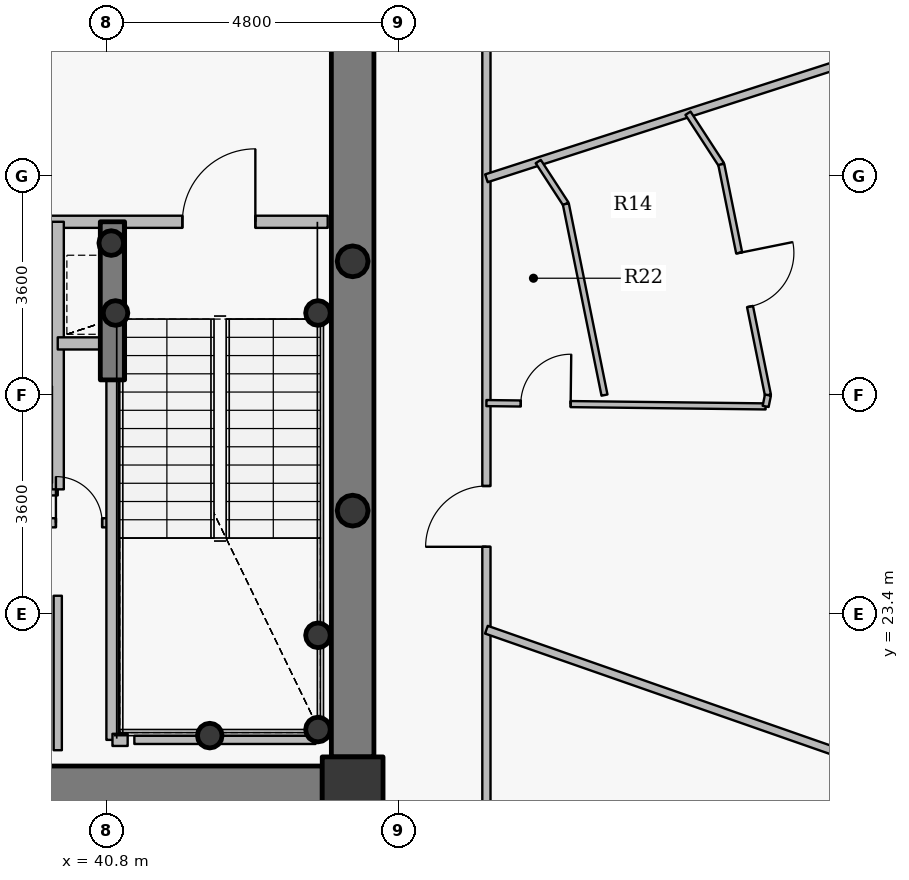
"""IFC4 building model, lengths in metres.
Left out: names, types, materials, properties, quantities, classifications, styles, units other than length and angle.
Written with IfcOpenShell. Run it as: python <this file> out.ifc"""

import sys

from ifc_helpers import new_model, si_unit, direction, frame, frame_2d, origin, origin_2d, place, context, subcontext, project, spatial, rectangle, hollow_circle, extrude, source, transform, mapped, element, fill, save


model = new_model("IFC4")
c1 = context("Model", 3, precision=1e-05, world=origin(), true_north=direction((0.0, 1.0)))
c2 = subcontext(c1, "Body", "Model", "MODEL_VIEW")
j1 = project(units=[si_unit("LENGTHUNIT", "METRE"), si_unit("PLANEANGLEUNIT", "RADIAN")], contexts=[c1])
p1 = place(None, origin())
s1 = spatial("IfcSite", under=j1, at=p1, CompositionType="ELEMENT")
p2 = place(p1, origin())
s2 = spatial("IfcBuilding", under=s1, at=p2, CompositionType="ELEMENT")
p3 = place(p2, frame((0.0, 0.0, 303.0)))
s3 = spatial("IfcBuildingStorey", under=s2, at=p3, CompositionType="ELEMENT", Elevation=303.0)
p4 = place(p3, frame((44.85, 20.55, 0.0), z_axis=(0.0, 0.0, 1.0), x_axis=(1.0, 0.0, 0.0)))
e1 = element("IfcColumn", 1, at=p4, inside=s3, PredefinedType="COLUMN", context=c2, shape_type="SweptSolid", body=[
    extrude(rectangle(XDim=1.0, YDim=1.0, at=origin_2d()), origin(), (0.0, 0.0, 1.0), 3.75),
])
for number, where, z_axis, x_axis in (
    (2, (44.28, 21.5, 0.0), (0.0, 0.0, 1.0), (1.0, 0.0, 0.0)),
    (3, (44.28, 23.05, 0.0), (0.0, 0.0, 1.0), (1.0, 0.0, 0.0)),
    (4, (42.5, 21.4, 0.0), (0.0, 0.0, 1.0), (1.0, 0.0, 0.0)),
    (5, (40.95, 28.35, 0.0), (0.0, 0.0, 1.0), (1.0, 0.0, 0.0)),
    (6, (44.28, 28.35, 0.0), (0.0, 0.0, 1.0), (1.0, 0.0, 0.0)),
    (7, (40.88, 29.5, 0.0), (0.0, 0.0, 1.0), (1.0, 0.0, 0.0)),
):
    element("IfcColumn", number, at=place(p3, frame(where, z_axis=z_axis, x_axis=x_axis)), inside=s3, PredefinedType="COLUMN", context=c2, shape_type="SweptSolid", body=[
        extrude(hollow_circle(Radius=0.203, WallThickness=0.016, at=origin_2d()), origin(), (0.0, 0.0, 1.0), 3.75),
    ])
p5 = place(p3, frame((44.85, 32.95, 0.0), z_axis=(0.0, 0.0, 1.0), x_axis=(0.0, -1.0, 0.0)))
e8 = element("IfcWall", 8, at=p5, inside=s3, PredefinedType="SHEAR", context=c2, shape_type="SweptSolid", body=[
    extrude(rectangle(XDim=11.9, YDim=0.7, at=frame_2d((5.95, 0.0))), origin(), (0.0, 0.0, 1.0), 3.05),
])
p6 = place(p3, frame((44.35, 20.55, 0.0), z_axis=(0.0, 0.0, 1.0), x_axis=(-1.0, 0.0, 0.0)))
e9 = element("IfcWall", 9, at=p6, inside=s3, PredefinedType="SHEAR", context=c2, shape_type="SweptSolid", body=[
    extrude(rectangle(XDim=16.7, YDim=0.7, at=frame_2d((8.35, 0.0))), origin(), (0.0, 0.0, 1.0), 3.05),
])
p7 = place(p6, frame((12.925, 0.0, 0.0)))
e10 = element("IfcOpeningElement", 10, at=p7, cuts=e9, PredefinedType="OPENING", context=c2, shape_type="SweptSolid", body=[
    extrude(rectangle(XDim=1.15, YDim=2.15, at=origin_2d()), frame((0.575, 0.36, 1.075), z_axis=(0.0, -1.0, 0.0), x_axis=(1.0, 0.0, 0.0)), (0.0, 0.0, 1.0), 0.72),
])
p8 = place(p6, frame((9.1, 0.0, 0.0)))
e11 = element("IfcOpeningElement", 11, at=p8, cuts=e9, PredefinedType="OPENING", context=c2, shape_type="SweptSolid", body=[
    extrude(rectangle(XDim=1.15, YDim=2.15, at=origin_2d()), frame((0.575, 0.36, 1.075), z_axis=(0.0, -1.0, 0.0), x_axis=(1.0, 0.0, 0.0)), (0.0, 0.0, 1.0), 0.72),
])
p9 = place(p3, frame((40.9, 27.25, 0.0), z_axis=(0.0, 0.0, 1.0), x_axis=(0.0, 1.0, 0.0)))
e12 = element("IfcWall", 12, at=p9, inside=s3, PredefinedType="SHEAR", context=c2, shape_type="SweptSolid", body=[
    extrude(rectangle(XDim=2.6, YDim=0.4, at=frame_2d((1.3, 0.0))), origin(), (0.0, 0.0, 1.0), 3.1),
])
for number, where, z_axis, x_axis in (
    (13, (44.85, 25.1, 0.0), (0.0, 0.0, 1.0), (1.0, 0.0, 0.0)),
    (14, (44.85, 29.2, 0.0), (0.0, 0.0, 1.0), (1.0, 0.0, 0.0)),
):
    element("IfcColumn", number, at=place(p3, frame(where, z_axis=z_axis, x_axis=x_axis)), inside=s3, PredefinedType="COLUMN", context=c2, shape_type="SweptSolid", body=[
        extrude(hollow_circle(Radius=0.254, WallThickness=0.02, at=origin_2d()), origin(), (0.0, 0.0, 1.0), 3.75),
    ])
p10 = place(p3, frame((35.05, 27.25, 0.0), z_axis=(0.0, 0.0, 1.0), x_axis=(1.0, 0.0, 0.0)))
e15 = element("IfcWall", 15, at=p10, inside=s3, PredefinedType="PARTITIONING", context=c2, shape_type="SweptSolid", body=[
    extrude(rectangle(XDim=4.95, YDim=0.2, at=frame_2d((2.475, 0.0))), origin(), (0.0, 0.0, 1.0), 3.085),
])
p11 = place(p3, frame((35.45, 25.45, 0.0), z_axis=(0.0, 0.0, 1.0), x_axis=(1.0, 0.0, 0.0)))
e16 = element("IfcWall", 16, at=p11, inside=s3, PredefinedType="PARTITIONING", context=c2, shape_type="SweptSolid", body=[
    extrude(rectangle(XDim=4.55, YDim=0.2, at=frame_2d((2.275, 0.0))), origin(), (0.0, 0.0, 1.0), 3.085),
])
p12 = place(p11, frame((0.25, 0.0, 0.0)))
e17 = element("IfcOpeningElement", 17, at=p12, cuts=e16, PredefinedType="OPENING", context=c2, shape_type="SweptSolid", body=[
    extrude(rectangle(XDim=1.05, YDim=2.15, at=origin_2d()), frame((0.525, 0.11, 1.075), z_axis=(0.0, -1.0, 0.0), x_axis=(1.0, 0.0, 0.0)), (0.0, 0.0, 1.0), 0.22),
])
p13 = place(p11, frame((1.745, 0.0, 0.0)))
e18 = element("IfcOpeningElement", 18, at=p13, cuts=e16, PredefinedType="OPENING", context=c2, shape_type="SweptSolid", body=[
    extrude(rectangle(XDim=1.05, YDim=2.15, at=origin_2d()), frame((0.525, 0.11, 1.075), z_axis=(0.0, -1.0, 0.0), x_axis=(1.0, 0.0, 0.0)), (0.0, 0.0, 1.0), 0.22),
])
p14 = place(p11, frame((3.165, 0.0, 0.0)))
e19 = element("IfcOpeningElement", 19, at=p14, cuts=e16, PredefinedType="OPENING", context=c2, shape_type="SweptSolid", body=[
    extrude(rectangle(XDim=1.05, YDim=2.15, at=origin_2d()), frame((0.525, 0.11, 1.075), z_axis=(0.0, -1.0, 0.0), x_axis=(1.0, 0.0, 0.0)), (0.0, 0.0, 1.0), 0.22),
])
p15 = place(p3, frame((35.95, 29.85, 0.0), z_axis=(0.0, 0.0, 1.0), x_axis=(1.0, 0.0, 0.0)))
e20 = element("IfcWall", 20, at=p15, inside=s3, PredefinedType="PARTITIONING", context=c2, shape_type="SweptSolid", body=[
    extrude(rectangle(XDim=8.49, YDim=0.2, at=frame_2d((4.245, 0.0))), origin(), (0.0, 0.0, 1.0), 3.085),
])
p16 = place(p15, frame((6.1, 0.0, 0.0)))
e21 = element("IfcOpeningElement", 21, at=p16, cuts=e20, PredefinedType="OPENING", context=c2, shape_type="SweptSolid", body=[
    extrude(rectangle(XDim=1.2, YDim=2.15, at=origin_2d()), frame((0.6, 0.11, 1.075), z_axis=(0.0, -1.0, 0.0), x_axis=(1.0, 0.0, 0.0)), (0.0, 0.0, 1.0), 0.22),
])
p17 = place(p15, frame((0.37, 0.0, 0.0)))
e22 = element("IfcOpeningElement", 22, at=p17, cuts=e20, PredefinedType="OPENING", context=c2, shape_type="SweptSolid", body=[
    extrude(rectangle(XDim=1.15, YDim=2.15, at=origin_2d()), frame((0.575, 0.11, 1.075), z_axis=(0.0, -1.0, 0.0), x_axis=(1.0, 0.0, 0.0)), (0.0, 0.0, 1.0), 0.22),
])
p18 = place(p15, frame((2.425, 0.0, 0.0)))
e23 = element("IfcOpeningElement", 23, at=p18, cuts=e20, PredefinedType="OPENING", context=c2, shape_type="SweptSolid", body=[
    extrude(rectangle(XDim=1.05, YDim=2.15, at=origin_2d()), frame((0.525, 0.11, 1.075), z_axis=(0.0, -1.0, 0.0), x_axis=(1.0, 0.0, 0.0)), (0.0, 0.0, 1.0), 0.22),
])
p19 = place(p3, frame((39.8, 24.9, 0.0), z_axis=(0.0, 0.0, 1.0), x_axis=(1.0, 0.0, 0.0)))
e24 = element("IfcWall", 24, at=p19, inside=s3, PredefinedType="PARTITIONING", context=c2, shape_type="SweptSolid", body=[
    extrude(rectangle(XDim=1.1, YDim=0.15, at=frame_2d((0.55, 0.0))), origin(), (0.0, 0.0, 1.0), 3.5),
])
p20 = place(p19, frame((0.17, 0.0, 0.0)))
e25 = element("IfcOpeningElement", 25, at=p20, cuts=e24, PredefinedType="OPENING", context=c2, shape_type="SweptSolid", body=[
    extrude(rectangle(XDim=0.76, YDim=2.1, at=origin_2d()), frame((0.38, 0.085, 1.05), z_axis=(0.0, -1.0, 0.0), x_axis=(1.0, 0.0, 0.0)), (0.0, 0.0, 1.0), 0.17),
])
p21 = place(p3, frame((40.0, 25.45, 0.0), z_axis=(0.0, 0.0, 1.0), x_axis=(0.0, 1.0, 0.0)))
e26 = element("IfcWall", 26, at=p21, inside=s3, PredefinedType="PARTITIONING", context=c2, shape_type="SweptSolid", body=[
    extrude(rectangle(XDim=4.4, YDim=0.2, at=frame_2d((2.2, 0.0))), origin(), (0.0, 0.0, 1.0), 3.5),
])
p22 = place(p3, frame((40.0, 27.85, 0.0), z_axis=(0.0, 0.0, 1.0), x_axis=(1.0, 0.0, 0.0)))
e27 = element("IfcWall", 27, at=p22, inside=s3, PredefinedType="PARTITIONING", context=c2, shape_type="SweptSolid", body=[
    extrude(rectangle(XDim=0.9, YDim=0.2, at=frame_2d((0.45, 0.0))), origin(), (0.0, 0.0, 1.0), 3.5),
])
p23 = place(p3, frame((40.9, 21.33, 0.0), z_axis=(0.0, 0.0, 1.0), x_axis=(0.0, 1.0, 0.0)))
e28 = element("IfcWall", 28, at=p23, inside=s3, PredefinedType="PARTITIONING", context=c2, shape_type="SweptSolid", body=[
    extrude(rectangle(XDim=5.91, YDim=0.2, at=frame_2d((2.955, 0.0))), origin(), (0.0, 0.0, 1.0), 3.035),
])
p24 = place(p3, frame((40.9, 21.33, 0.0), z_axis=(0.0, 0.0, 1.0), x_axis=(1.0, 0.0, 0.0)))
e29 = element("IfcWall", 29, at=p24, inside=s3, PredefinedType="PARTITIONING", context=c2, shape_type="SweptSolid", body=[
    extrude(rectangle(XDim=0.25, YDim=0.2, at=frame_2d((0.125, 0.0))), origin(), (0.0, 0.0, 1.0), 3.035),
])
p25 = place(p3, frame((47.05, 18.35, 0.0), z_axis=(0.0, 0.0, 1.0), x_axis=(0.0, 1.0, 0.0)))
e30 = element("IfcWall", 30, at=p25, inside=s3, PredefinedType="PARTITIONING", context=c2, shape_type="SweptSolid", body=[
    extrude(rectangle(XDim=17.3, YDim=0.135, at=frame_2d((8.65, 0.0))), origin(), (0.0, 0.0, 1.0), 3.035),
])
p26 = place(p25, frame((6.155, 0.0, 0.0)))
e31 = element("IfcOpeningElement", 31, at=p26, cuts=e30, PredefinedType="OPENING", context=c2, shape_type="SweptSolid", body=[
    extrude(rectangle(XDim=1.0, YDim=2.15, at=origin_2d()), frame((0.5, 0.078, 1.075), z_axis=(0.0, -1.0, 0.0), x_axis=(1.0, 0.0, 0.0)), (0.0, 0.0, 1.0), 0.155),
])
p27 = place(p3, frame((47.05, 23.142, 0.0), z_axis=(0.0, 0.0, 1.0), x_axis=(0.94410974345, -0.329631297547, 0.0)))
e32 = element("IfcWall", 32, at=p27, inside=s3, PredefinedType="PARTITIONING", context=c2, shape_type="SweptSolid", body=[
    extrude(rectangle(XDim=9.785, YDim=0.135, at=frame_2d((4.893, 0.0))), origin(), (0.0, 0.0, 1.0), 2.985),
])
p28 = place(p3, frame((47.05, 26.869, 0.0), z_axis=(0.0, 0.0, 1.0), x_axis=(0.999929100649, -0.011907714968, 0.0)))
e33 = element("IfcWall", 33, at=p28, inside=s3, PredefinedType="PARTITIONING", context=c2, shape_type="SweptSolid", body=[
    extrude(rectangle(XDim=4.593, YDim=0.1, at=frame_2d((2.296, 0.0))), origin(), (0.0, 0.0, 1.0), 3.035),
])
p29 = place(p28, frame((0.565, 0.0, 0.0)))
e34 = element("IfcOpeningElement", 34, at=p29, cuts=e33, PredefinedType="OPENING", context=c2, shape_type="SweptSolid", body=[
    extrude(rectangle(XDim=0.82, YDim=2.1, at=origin_2d()), frame((0.41, 0.06, 1.05), z_axis=(0.0, -1.0, 0.0), x_axis=(1.0, 0.0, 0.0)), (0.0, 0.0, 1.0), 0.12),
])
p30 = place(p3, frame((47.05, 30.565, 0.0), z_axis=(0.0, 0.0, 1.0), x_axis=(0.951682976888, 0.307082255269, 0.0)))
e35 = element("IfcWall", 35, at=p30, inside=s3, PredefinedType="PARTITIONING", context=c2, shape_type="SweptSolid", body=[
    extrude(rectangle(XDim=9.963, YDim=0.135, at=frame_2d((4.981, 0.0))), origin(), (0.0, 0.0, 1.0), 2.985),
])
p31 = place(p3, frame((47.903, 30.841, 0.0), z_axis=(0.0, 0.0, 1.0), x_axis=(0.545586849168, -0.838054288227, 0.0)))
e36 = element("IfcWall", 36, at=p31, inside=s3, PredefinedType="PARTITIONING", context=c2, shape_type="SweptSolid", body=[
    extrude(rectangle(XDim=0.832, YDim=0.1, at=frame_2d((0.416, 0.0))), origin(), (0.0, 0.0, 1.0), 3.035),
])
p32 = place(p3, frame((48.356, 30.144, 0.0), z_axis=(0.0, 0.0, 1.0), x_axis=(0.198208908342, -0.98015979751, 0.0)))
e37 = element("IfcWall", 37, at=p32, inside=s3, PredefinedType="PARTITIONING", context=c2, shape_type="SweptSolid", body=[
    extrude(rectangle(XDim=3.208, YDim=0.1, at=frame_2d((1.604, 0.0))), origin(), (0.0, 0.0, 1.0), 3.035),
])
p33 = place(p3, frame((50.365, 31.635, 0.0), z_axis=(0.0, 0.0, 1.0), x_axis=(0.545458599095, -0.83813776712, 0.0)))
e38 = element("IfcWall", 38, at=p33, inside=s3, PredefinedType="PARTITIONING", context=c2, shape_type="SweptSolid", body=[
    extrude(rectangle(XDim=1.003, YDim=0.1, at=frame_2d((0.502, 0.0))), origin(), (0.0, 0.0, 1.0), 3.035),
])
p34 = place(p3, frame((50.913, 30.794, 0.0), z_axis=(0.0, 0.0, 1.0), x_axis=(0.198226068862, -0.980156327135, 0.0)))
e39 = element("IfcWall", 39, at=p34, inside=s3, PredefinedType="PARTITIONING", context=c2, shape_type="SweptSolid", body=[
    extrude(rectangle(XDim=3.871, YDim=0.1, at=frame_2d((1.936, 0.0))), origin(), (0.0, 0.0, 1.0), 3.035),
])
p35 = place(p34, frame((1.486, 0.0, 0.0)))
e40 = element("IfcOpeningElement", 40, at=p35, cuts=e39, PredefinedType="OPENING", context=c2, shape_type="SweptSolid", body=[
    extrude(rectangle(XDim=0.9, YDim=2.1, at=origin_2d()), frame((0.45, 0.06, 1.05), z_axis=(0.0, -1.0, 0.0), x_axis=(1.0, 0.0, 0.0)), (0.0, 0.0, 1.0), 0.12),
])
p36 = place(p3, frame((51.642, 26.814, 0.0), z_axis=(0.0, 0.0, 1.0), x_axis=(0.198094703821, 0.980182885138, 0.0)))
e41 = element("IfcWall", 41, at=p36, inside=s3, PredefinedType="PARTITIONING", context=c2, shape_type="SweptSolid", body=[
    extrude(rectangle(XDim=0.19, YDim=0.1, at=frame_2d((0.095, 0.0))), origin(), (0.0, 0.0, 1.0), 3.035),
])
p37 = place(p3, frame((44.24, 21.33, 0.0), z_axis=(0.0, 0.0, 1.0), x_axis=(-1.0, 0.0, 0.0)))
e42 = element("IfcWall", 42, at=p37, inside=s3, PredefinedType="PARTITIONING", context=c2, shape_type="SweptSolid", body=[
    extrude(rectangle(XDim=2.98, YDim=0.135, at=frame_2d((1.49, 0.0))), origin(), (0.0, 0.0, 1.0), 3.035),
])
p38 = place(p3, frame((40.0, 23.7, 0.0), z_axis=(0.0, 0.0, 1.0), x_axis=(0.0, -1.0, 0.0)))
e43 = element("IfcWall", 43, at=p38, inside=s3, PredefinedType="PARTITIONING", context=c2, shape_type="SweptSolid", body=[
    extrude(rectangle(XDim=2.54, YDim=0.135, at=frame_2d((1.27, 0.0))), origin(), (0.0, 0.0, 1.0), 3.035),
])
p39 = place(p3, frame((45.2, 20.508, 0.0), z_axis=(0.0, 0.0, 1.0), x_axis=(0.0, 1.0, 0.0)))
e44 = element("IfcWall", 44, at=p39, inside=s3, PredefinedType="PARTITIONING", context=c2, shape_type="SweptSolid", body=[
    extrude(rectangle(XDim=0.532, YDim=0.135, at=frame_2d((0.266, 0.0))), origin(), (0.0, 0.0, 1.0), 3.5),
])
m1 = source(origin(), c2, "Body", "SweptSolid", [
    extrude(rectangle(XDim=1.2, YDim=2.15, at=origin_2d()), frame((0.6, 0.025, 1.075), z_axis=(0.0, -1.0, 0.0), x_axis=(1.0, 0.0, 0.0)), (0.0, 0.0, 1.0), 0.05),
])
p40 = place(p16, origin())
e45 = element("IfcDoor", 45, at=p40, inside=s3, OperationType="SINGLE_SWING_RIGHT", PredefinedType="DOOR", context=c2, shape_type="MappedRepresentation", body=[
    mapped(m1, transform((0.0, 0.0, 0.0), x_axis=(1.0, 0.0, 0.0), y_axis=(0.0, 1.0, 0.0), z_axis=(0.0, 0.0, 1.0), scale=1.0)),
])
fill(e21, e45)
m2 = source(origin(), c2, "Body", "SweptSolid", [
    extrude(rectangle(XDim=1.0, YDim=2.15, at=origin_2d()), frame((0.5, 0.025, 1.075), z_axis=(0.0, -1.0, 0.0), x_axis=(1.0, 0.0, 0.0)), (0.0, 0.0, 1.0), 0.05),
])
p41 = place(p26, origin())
e46 = element("IfcDoor", 46, at=p41, inside=s3, OperationType="SINGLE_SWING_LEFT", PredefinedType="DOOR", context=c2, shape_type="MappedRepresentation", body=[
    mapped(m2, transform((0.0, 0.0, 0.0), x_axis=(1.0, 0.0, 0.0), y_axis=(0.0, 1.0, 0.0), z_axis=(0.0, 0.0, 1.0), scale=1.0)),
])
fill(e31, e46)
m3 = source(origin(), c2, "Body", "SweptSolid", [
    extrude(rectangle(XDim=0.82, YDim=2.1, at=origin_2d()), frame((0.41, 0.025, 1.05), z_axis=(0.0, -1.0, 0.0), x_axis=(1.0, 0.0, 0.0)), (0.0, 0.0, 1.0), 0.05),
])
p42 = place(p29, origin())
e47 = element("IfcDoor", 47, at=p42, inside=s3, OperationType="SINGLE_SWING_RIGHT", PredefinedType="DOOR", context=c2, shape_type="MappedRepresentation", body=[
    mapped(m3, transform((0.0, 0.0, 0.0), x_axis=(1.0, 0.0, 0.0), y_axis=(0.0, 1.0, 0.0), z_axis=(0.0, 0.0, 1.0), scale=1.0)),
])
fill(e34, e47)
m4 = source(origin(), c2, "Body", "SweptSolid", [
    extrude(rectangle(XDim=0.9, YDim=2.1, at=origin_2d()), frame((0.45, 0.025, 1.05), z_axis=(0.0, -1.0, 0.0), x_axis=(1.0, 0.0, 0.0)), (0.0, 0.0, 1.0), 0.05),
])
p43 = place(p35, origin())
e48 = element("IfcDoor", 48, at=p43, inside=s3, OperationType="SINGLE_SWING_LEFT", PredefinedType="DOOR", context=c2, shape_type="MappedRepresentation", body=[
    mapped(m4, transform((0.0, 0.0, 0.0), x_axis=(1.0, 0.0, 0.0), y_axis=(0.0, 1.0, 0.0), z_axis=(0.0, 0.0, 1.0), scale=1.0)),
])
fill(e40, e48)
m5 = source(origin(), c2, "Body", "SweptSolid", [
    extrude(rectangle(XDim=0.76, YDim=2.1, at=origin_2d()), frame((0.38, 0.025, 1.05), z_axis=(0.0, -1.0, 0.0), x_axis=(1.0, 0.0, 0.0)), (0.0, 0.0, 1.0), 0.05),
])
p44 = place(p20, origin())
e49 = element("IfcDoor", 49, at=p44, inside=s3, OperationType="SINGLE_SWING_LEFT", PredefinedType="DOOR", context=c2, shape_type="MappedRepresentation", body=[
    mapped(m5, transform((0.0, 0.0, 0.0), x_axis=(1.0, 0.0, 0.0), y_axis=(0.0, 1.0, 0.0), z_axis=(0.0, 0.0, 1.0), scale=1.0)),
])
fill(e25, e49)
save(model, sys.argv[1])
